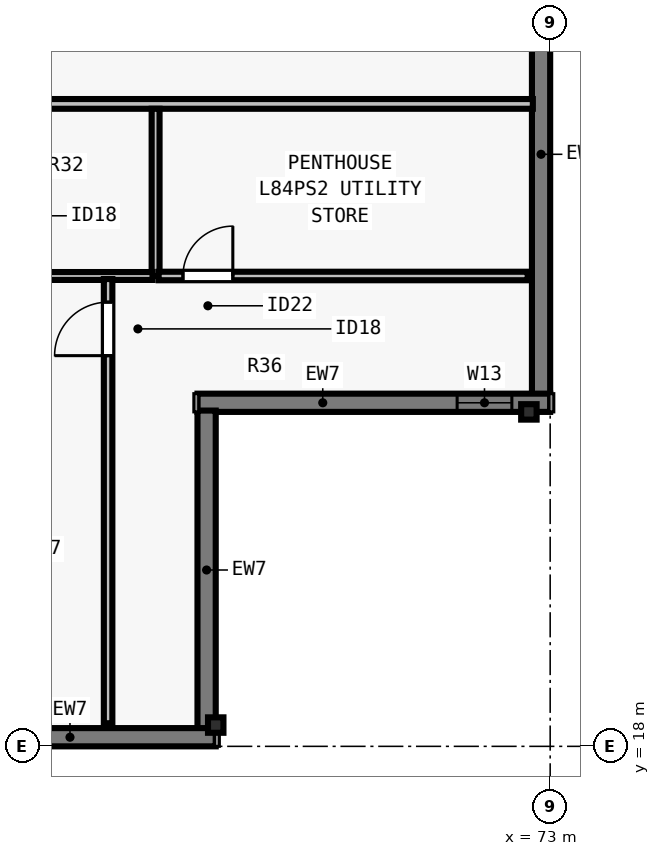
"""IFC4 building model, lengths in metres.
Left out: names, types, materials, properties, quantities, classifications, styles, units other than length and angle.
Written with IfcOpenShell. Run it as: python <this file> out.ifc"""

import sys

from ifc_helpers import new_model, si_unit, direction, frame, frame_2d, origin, origin_2d, place, context, subcontext, project, spatial, rectangle, i_section, extrude, element, fill, save


model = new_model("IFC4")
c1 = context("Model", 3, precision=1e-05, world=origin(), true_north=direction((0.0, 1.0)))
c2 = subcontext(c1, "Body", "Model", "MODEL_VIEW")
j1 = project(units=[si_unit("LENGTHUNIT", "METRE"), si_unit("PLANEANGLEUNIT", "RADIAN")], contexts=[c1])
p1 = place(None, origin())
s1 = spatial("IfcSite", under=j1, at=p1, CompositionType="ELEMENT")
p2 = place(p1, origin())
s2 = spatial("IfcBuilding", under=s1, at=p2, CompositionType="ELEMENT")
p3 = place(p2, frame((0.0, 0.0, 305.0)))
s3 = spatial("IfcBuildingStorey", under=s2, at=p3, CompositionType="ELEMENT", Elevation=305.0)
for number, where, z_axis, x_axis in (
    (1, (67.5, 18.35, 0.0), (0.0, 0.0, 1.0), (1.0, 0.0, 0.0)),
    (2, (72.65, 23.5, 0.0), (0.0, 0.0, 1.0), (0.0, 1.0, 0.0)),
):
    element("IfcColumn", number, at=place(p3, frame(where, z_axis=z_axis, x_axis=x_axis)), inside=s3, PredefinedType="COLUMN", context=c2, shape_type="SweptSolid", body=[
        extrude(i_section(OverallWidth=0.254, OverallDepth=0.254, WebThickness=0.009, FlangeThickness=0.014, FilletRadius=0.013, at=origin_2d()), origin(), (0.0, 0.0, 1.0), 3.5),
    ])
p4 = place(p3, frame((72.85, 35.6, 0.0), z_axis=(0.0, 0.0, 1.0), x_axis=(0.0, -1.0, 0.0)))
e3 = element("IfcWall", 3, at=p4, inside=s3, PredefinedType="SOLIDWALL", context=c2, shape_type="SweptSolid", body=[
    extrude(rectangle(XDim=11.822, YDim=0.3, at=frame_2d((5.911, 0.0))), origin(), (0.0, 0.0, 1.0), 3.29),
])
p5 = place(p4, frame((2.105, 0.0, 0.8)))
e4 = element("IfcOpeningElement", 4, at=p5, cuts=e3, PredefinedType="OPENING", context=c2, shape_type="SweptSolid", body=[
    extrude(rectangle(XDim=1.65, YDim=1.758, at=frame_2d((0.825, 0.879))), frame((0.0, 0.16, 0.0), z_axis=(0.0, -1.0, 0.0), x_axis=(1.0, 0.0, 0.0)), (0.0, 0.0, 1.0), 0.32),
])
p6 = place(p3, frame((73.0, 23.65, 0.0), z_axis=(0.0, 0.0, 1.0), x_axis=(-1.0, 0.0, 0.0)))
e5 = element("IfcWall", 5, at=p6, inside=s3, PredefinedType="SOLIDWALL", context=c2, shape_type="SweptSolid", body=[
    extrude(rectangle(XDim=5.8, YDim=0.3, at=frame_2d((2.9, 0.0))), origin(), (0.0, 0.0, 1.0), 3.29),
])
p7 = place(p6, frame((0.63, 0.0, 0.8)))
e6 = element("IfcOpeningElement", 6, at=p7, cuts=e5, PredefinedType="OPENING", context=c2, shape_type="SweptSolid", body=[
    extrude(rectangle(XDim=0.9, YDim=1.75, at=frame_2d((0.45, 0.875))), frame((0.0, 0.16, 0.0), z_axis=(0.0, -1.0, 0.0), x_axis=(1.0, 0.0, 0.0)), (0.0, 0.0, 1.0), 0.32),
])
p8 = place(p3, frame((67.35, 23.522, 0.0), z_axis=(0.0, 0.0, 1.0), x_axis=(0.0, -1.0, 0.0)))
e7 = element("IfcWall", 7, at=p8, inside=s3, PredefinedType="SOLIDWALL", context=c2, shape_type="SweptSolid", body=[
    extrude(rectangle(XDim=5.244, YDim=0.3, at=frame_2d((2.622, 0.0))), origin(), (0.0, 0.0, 1.0), 3.29),
])
p9 = place(p3, frame((67.5, 18.15, 0.0), z_axis=(0.0, 0.0, 1.0), x_axis=(-1.0, 0.0, 0.0)))
e8 = element("IfcWall", 8, at=p9, inside=s3, PredefinedType="SOLIDWALL", context=c2, shape_type="SweptSolid", body=[
    extrude(rectangle(XDim=30.722, YDim=0.3, at=frame_2d((15.361, 0.0))), origin(), (0.0, 0.0, 1.0), 3.29),
])
p10 = place(p9, frame((4.944, 0.0, 0.8)))
e9 = element("IfcOpeningElement", 9, at=p10, cuts=e8, PredefinedType="OPENING", context=c2, shape_type="SweptSolid", body=[
    extrude(rectangle(XDim=1.65, YDim=1.758, at=frame_2d((0.825, 0.879))), frame((0.0, 0.16, 0.0), z_axis=(0.0, -1.0, 0.0), x_axis=(1.0, 0.0, 0.0)), (0.0, 0.0, 1.0), 0.32),
])
p11 = place(p9, frame((7.756, 0.0, 0.8)))
e10 = element("IfcOpeningElement", 10, at=p11, cuts=e8, PredefinedType="OPENING", context=c2, shape_type="SweptSolid", body=[
    extrude(rectangle(XDim=2.0, YDim=1.758, at=frame_2d((1.0, 0.879))), frame((0.0, 0.16, 0.0), z_axis=(0.0, -1.0, 0.0), x_axis=(1.0, 0.0, 0.0)), (0.0, 0.0, 1.0), 0.32),
])
p12 = place(p9, frame((12.617, 0.0, 0.8)))
e11 = element("IfcOpeningElement", 11, at=p12, cuts=e8, PredefinedType="OPENING", context=c2, shape_type="SweptSolid", body=[
    extrude(rectangle(XDim=1.65, YDim=1.758, at=frame_2d((0.825, 0.879))), frame((0.0, 0.16, 0.0), z_axis=(0.0, -1.0, 0.0), x_axis=(1.0, 0.0, 0.0)), (0.0, 0.0, 1.0), 0.32),
])
p13 = place(p9, frame((16.28, 0.0, 0.8)))
e12 = element("IfcOpeningElement", 12, at=p13, cuts=e8, PredefinedType="OPENING", context=c2, shape_type="SweptSolid", body=[
    extrude(rectangle(XDim=2.0, YDim=1.758, at=frame_2d((1.0, 0.879))), frame((0.0, 0.16, 0.0), z_axis=(0.0, -1.0, 0.0), x_axis=(1.0, 0.0, 0.0)), (0.0, 0.0, 1.0), 0.32),
])
p14 = place(p9, frame((21.142, 0.0, 0.8)))
e13 = element("IfcOpeningElement", 13, at=p14, cuts=e8, PredefinedType="OPENING", context=c2, shape_type="SweptSolid", body=[
    extrude(rectangle(XDim=1.65, YDim=1.758, at=frame_2d((0.825, 0.879))), frame((0.0, 0.16, 0.0), z_axis=(0.0, -1.0, 0.0), x_axis=(1.0, 0.0, 0.0)), (0.0, 0.0, 1.0), 0.32),
])
p15 = place(p9, frame((23.954, 0.0, 0.8)))
e14 = element("IfcOpeningElement", 14, at=p15, cuts=e8, PredefinedType="OPENING", context=c2, shape_type="SweptSolid", body=[
    extrude(rectangle(XDim=2.0, YDim=1.758, at=frame_2d((1.0, 0.879))), frame((0.0, 0.16, 0.0), z_axis=(0.0, -1.0, 0.0), x_axis=(1.0, 0.0, 0.0)), (0.0, 0.0, 1.0), 0.32),
])
p16 = place(p3, frame((31.285, 28.565, 0.0), z_axis=(0.0, 0.0, 1.0), x_axis=(1.0, 0.0, 0.0)))
e15 = element("IfcWall", 15, at=p16, inside=s3, PredefinedType="PARTITIONING", context=c2, shape_type="SweptSolid", body=[
    extrude(rectangle(XDim=41.43, YDim=0.16, at=frame_2d((20.715, 0.0))), origin(), (0.0, 0.0, 1.0), 3.009),
])
p17 = place(p16, frame((9.766, 0.0, 0.0)))
e16 = element("IfcOpeningElement", 16, at=p17, cuts=e15, PredefinedType="OPENING", context=c2, shape_type="SweptSolid", body=[
    extrude(rectangle(XDim=0.96, YDim=2.18, at=frame_2d((0.48, 1.09))), frame((0.0, 0.09, 0.0), z_axis=(0.0, -1.0, 0.0), x_axis=(1.0, 0.0, 0.0)), (0.0, 0.0, 1.0), 0.18),
])
p18 = place(p16, frame((30.346, 0.0, 0.0)))
e17 = element("IfcOpeningElement", 17, at=p18, cuts=e15, PredefinedType="OPENING", context=c2, shape_type="SweptSolid", body=[
    extrude(rectangle(XDim=0.96, YDim=2.18, at=frame_2d((0.48, 1.09))), frame((0.0, 0.09, 0.0), z_axis=(0.0, -1.0, 0.0), x_axis=(1.0, 0.0, 0.0)), (0.0, 0.0, 1.0), 0.18),
])
p19 = place(p3, frame((66.511, 25.735, 0.0), z_axis=(0.0, 0.0, 1.0), x_axis=(0.0, 1.0, 0.0)))
e18 = element("IfcWall", 18, at=p19, inside=s3, PredefinedType="PLUMBINGWALL", context=c2, shape_type="SweptSolid", body=[
    extrude(rectangle(XDim=2.75, YDim=0.13, at=frame_2d((1.375, 0.0))), origin(), (0.0, 0.0, 1.0), 3.29),
])
p20 = place(p3, frame((63.311, 25.735, 0.0), z_axis=(0.0, 0.0, 1.0), x_axis=(1.0, 0.0, 0.0)))
e19 = element("IfcWall", 19, at=p20, inside=s3, PredefinedType="PLUMBINGWALL", context=c2, shape_type="SweptSolid", body=[
    extrude(rectangle(XDim=3.15, YDim=0.13, at=frame_2d((1.575, 0.0))), origin(), (0.0, 0.0, 1.0), 3.29),
])
p21 = place(p3, frame((65.73, 18.38, 0.0), z_axis=(0.0, 0.0, 1.0), x_axis=(0.0, 1.0, 0.0)))
e20 = element("IfcWall", 20, at=p21, inside=s3, PredefinedType="PARTITIONING", context=c2, shape_type="SweptSolid", body=[
    extrude(rectangle(XDim=7.305, YDim=0.14, at=frame_2d((3.653, 0.0))), origin(), (0.0, 0.0, 1.0), 2.653),
])
p22 = place(p21, frame((6.045, 0.0, 0.0)))
e21 = element("IfcOpeningElement", 21, at=p22, cuts=e20, PredefinedType="OPENING", context=c2, shape_type="SweptSolid", body=[
    extrude(rectangle(XDim=0.88, YDim=2.1, at=frame_2d((0.44, 1.05))), frame((0.0, 0.08, 0.0), z_axis=(0.0, -1.0, 0.0), x_axis=(1.0, 0.0, 0.0)), (0.0, 0.0, 1.0), 0.16),
])
p23 = place(p3, frame((66.561, 25.735, 0.0), z_axis=(0.0, 0.0, 1.0), x_axis=(1.0, 0.0, 0.0)))
e22 = element("IfcWall", 22, at=p23, inside=s3, PredefinedType="PARTITIONING", context=c2, shape_type="SweptSolid", body=[
    extrude(rectangle(XDim=6.069, YDim=0.14, at=frame_2d((3.034, 0.0))), origin(), (0.0, 0.0, 1.0), 3.009),
])
p24 = place(p23, frame((0.4, 0.0, 0.0)))
e23 = element("IfcOpeningElement", 23, at=p24, cuts=e22, PredefinedType="OPENING", context=c2, shape_type="SweptSolid", body=[
    extrude(rectangle(XDim=0.82, YDim=2.1, at=frame_2d((0.41, 1.05))), frame((0.0, 0.08, 0.0), z_axis=(0.0, -1.0, 0.0), x_axis=(1.0, 0.0, 0.0)), (0.0, 0.0, 1.0), 0.16),
])
p25 = place(p7, origin())
e24 = element("IfcWindow", 24, at=p25, inside=s3, PartitioningType="SINGLE_PANEL", PredefinedType="WINDOW", context=c2, shape_type="SweptSolid", body=[
    extrude(rectangle(XDim=0.9, YDim=1.75, at=frame_2d((0.45, 0.875))), frame((0.0, -0.04, 0.0), z_axis=(0.0, -1.0, 0.0), x_axis=(1.0, 0.0, 0.0)), (0.0, 0.0, 1.0), 0.06),
])
fill(e6, e24)
p26 = place(p24, origin())
e25 = element("IfcDoor", 25, at=p26, inside=s3, OperationType="SINGLE_SWING_RIGHT", PredefinedType="DOOR", context=c2, shape_type="SweptSolid", body=[
    extrude(rectangle(XDim=0.82, YDim=2.1, at=frame_2d((0.41, 1.05))), frame((0.0, 0.025, 0.0), z_axis=(0.0, -1.0, 0.0), x_axis=(1.0, 0.0, 0.0)), (0.0, 0.0, 1.0), 0.05),
])
fill(e23, e25)
p27 = place(p22, origin())
e26 = element("IfcDoor", 26, at=p27, inside=s3, OperationType="SINGLE_SWING_LEFT", PredefinedType="DOOR", context=c2, shape_type="SweptSolid", body=[
    extrude(rectangle(XDim=0.88, YDim=2.1, at=frame_2d((0.44, 1.05))), frame((0.0, 0.025, 0.0), z_axis=(0.0, -1.0, 0.0), x_axis=(1.0, 0.0, 0.0)), (0.0, 0.0, 1.0), 0.05),
])
fill(e21, e26)
save(model, sys.argv[1])
